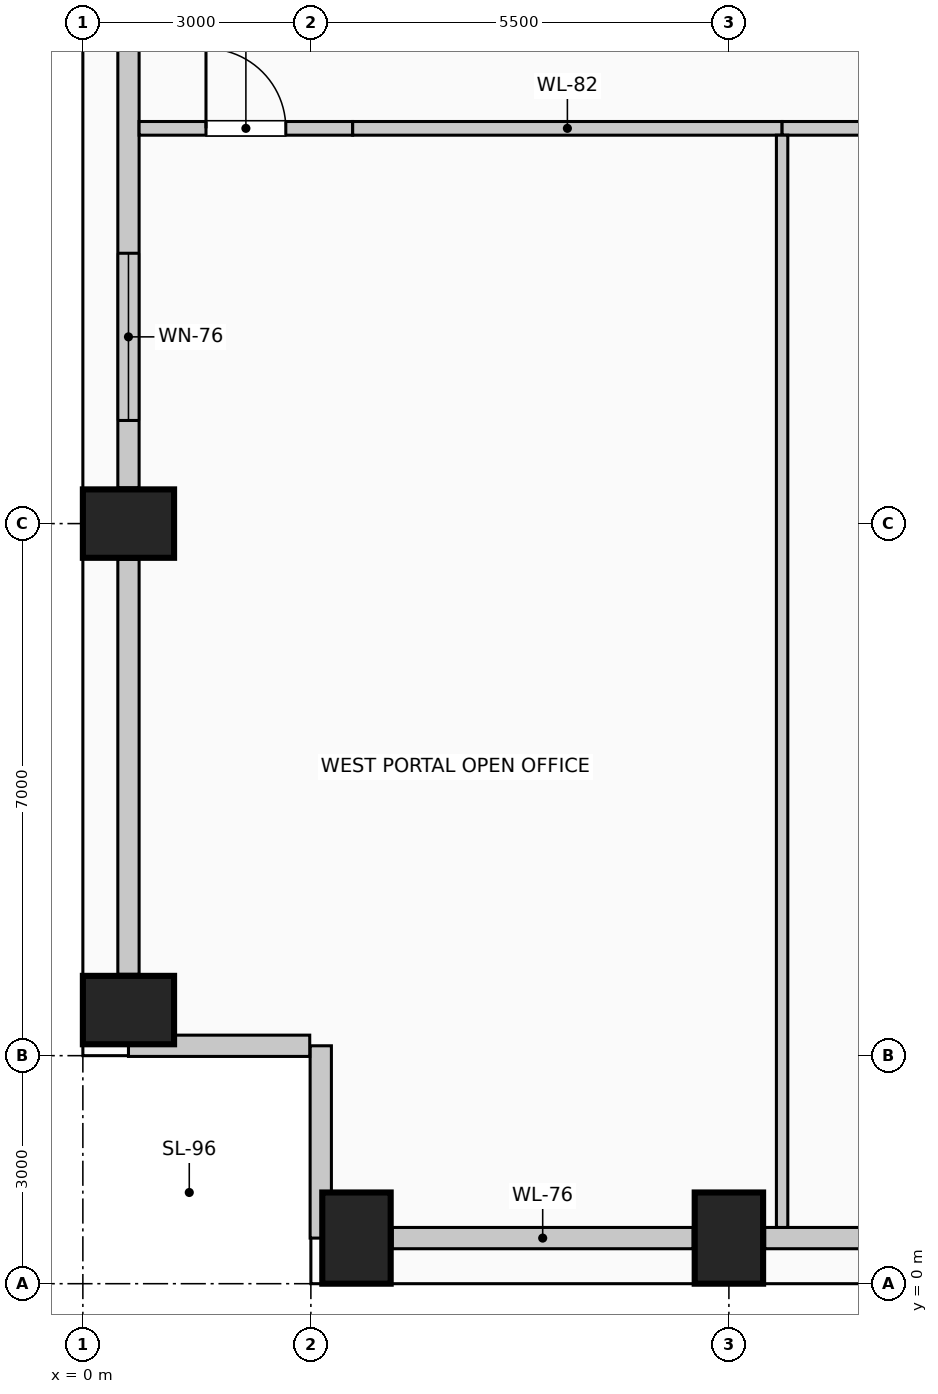
"""IFC4 building model, lengths in metres.
Left out: names, types, materials, properties, quantities, classifications, styles, units other than length and angle.
Written with IfcOpenShell. Run it as: python <this file> out.ifc"""

import sys

from ifc_helpers import new_model, si_unit, direction, frame, frame_2d, origin, origin_2d, place, context, subcontext, project, spatial, rectangle, extrude, element, fill, save


model = new_model("IFC4")
c1 = context("Model", 3, precision=1e-05, world=origin(), true_north=direction((0.0, 1.0)))
c2 = subcontext(c1, "Body", "Model", "MODEL_VIEW")
j1 = project(units=[si_unit("LENGTHUNIT", "METRE"), si_unit("PLANEANGLEUNIT", "RADIAN")], contexts=[c1])
p1 = place(None, origin())
s1 = spatial("IfcSite", under=j1, at=p1, CompositionType="ELEMENT")
p2 = place(p1, origin())
s2 = spatial("IfcBuilding", under=s1, at=p2, CompositionType="ELEMENT")
p3 = place(p2, frame((0.0, 0.0, 22.6)))
s3 = spatial("IfcBuildingStorey", under=s2, at=p3, CompositionType="ELEMENT", Elevation=22.6)
for number, where, z_axis, x_axis in (
    (1, (3.6, 0.6, 0.0), (0.0, 0.0, 1.0), (1.0, 0.0, 0.0)),
    (2, (8.5, 0.6, 0.0), (0.0, 0.0, 1.0), (1.0, 0.0, 0.0)),
    (3, (0.6, 3.6, 0.0), (0.0, 0.0, 1.0), (0.0, 1.0, 0.0)),
    (4, (0.6, 10.0, 0.0), (0.0, 0.0, 1.0), (0.0, 1.0, 0.0)),
):
    element("IfcColumn", number, at=place(p3, frame(where, z_axis=z_axis, x_axis=x_axis)), inside=s3, PredefinedType="COLUMN", context=c2, shape_type="SweptSolid", body=[
        extrude(rectangle(XDim=0.9, YDim=1.2, at=origin_2d()), origin(), (0.0, 0.0, 1.0), 4.0),
    ])
p4 = place(p3, frame((8.03, 0.6, 0.0), z_axis=(0.0, 0.0, 1.0), x_axis=(-1.0, 0.0, 0.0)))
e5 = element("IfcWall", 5, at=p4, inside=s3, PredefinedType="SOLIDWALL", context=c2, shape_type="SweptSolid", body=[
    extrude(rectangle(XDim=3.96, YDim=0.28, at=frame_2d((1.98, 0.0))), origin(), (0.0, 0.0, 1.0), 2.85),
])
p5 = place(p3, frame((13.53, 0.6, 0.0), z_axis=(0.0, 0.0, 1.0), x_axis=(-1.0, 0.0, 0.0)))
e6 = element("IfcWall", 6, at=p5, inside=s3, PredefinedType="SOLIDWALL", context=c2, shape_type="SweptSolid", body=[
    extrude(rectangle(XDim=4.56, YDim=0.28, at=frame_2d((2.28, 0.0))), origin(), (0.0, 0.0, 1.0), 2.85),
])
p6 = place(p3, frame((0.6, 4.07, 0.0), z_axis=(0.0, 0.0, 1.0), x_axis=(0.0, 1.0, 0.0)))
e7 = element("IfcWall", 7, at=p6, inside=s3, PredefinedType="SOLIDWALL", context=c2, shape_type="SweptSolid", body=[
    extrude(rectangle(XDim=5.46, YDim=0.28, at=frame_2d((2.73, 0.0))), origin(), (0.0, 0.0, 1.0), 2.85),
])
p7 = place(p3, frame((0.6, 10.47, 0.0), z_axis=(0.0, 0.0, 1.0), x_axis=(0.0, 1.0, 0.0)))
e8 = element("IfcWall", 8, at=p7, inside=s3, PredefinedType="SOLIDWALL", context=c2, shape_type="SweptSolid", body=[
    extrude(rectangle(XDim=7.06, YDim=0.28, at=frame_2d((3.53, 0.0))), origin(), (0.0, 0.0, 1.0), 2.85),
])
p8 = place(p7, frame((0.887, 0.0, 0.42)))
e9 = element("IfcOpeningElement", 9, at=p8, cuts=e8, PredefinedType="OPENING", context=c2, shape_type="SweptSolid", body=[
    extrude(rectangle(XDim=2.2, YDim=1.95, at=frame_2d((1.1, 0.975))), frame((0.0, 0.15, 0.0), z_axis=(0.0, -1.0, 0.0), x_axis=(1.0, 0.0, 0.0)), (0.0, 0.0, 1.0), 0.3),
])
p9 = place(p3, frame((3.13, 0.6, 0.0), z_axis=(0.0, 0.0, 1.0), x_axis=(0.0, 1.0, 0.0)))
e10 = element("IfcWall", 10, at=p9, inside=s3, PredefinedType="SOLIDWALL", context=c2, shape_type="SweptSolid", body=[
    extrude(rectangle(XDim=2.53, YDim=0.28, at=frame_2d((1.265, 0.0))), origin(), (0.0, 0.0, 1.0), 3.7),
])
p10 = place(p3, frame((2.985, 3.13, 0.0), z_axis=(0.0, 0.0, 1.0), x_axis=(-1.0, 0.0, 0.0)))
e11 = element("IfcWall", 11, at=p10, inside=s3, PredefinedType="SOLIDWALL", context=c2, shape_type="SweptSolid", body=[
    extrude(rectangle(XDim=2.385, YDim=0.28, at=frame_2d((1.192, 0.0))), origin(), (0.0, 0.0, 1.0), 3.7),
])
p11 = place(p3, frame((0.74, 15.2, 0.0), z_axis=(0.0, 0.0, 1.0), x_axis=(1.0, 0.0, 0.0)))
e12 = element("IfcWall", 12, at=p11, inside=s3, PredefinedType="PARTITIONING", context=c2, shape_type="SweptSolid", body=[
    extrude(rectangle(XDim=2.81, YDim=0.18, at=frame_2d((1.405, 0.0))), origin(), (0.0, 0.0, 1.0), 3.7),
])
p12 = place(p11, frame((0.88, 0.0, 0.0)))
e13 = element("IfcOpeningElement", 13, at=p12, cuts=e12, PredefinedType="OPENING", context=c2, shape_type="SweptSolid", body=[
    extrude(rectangle(XDim=1.05, YDim=2.15, at=frame_2d((0.525, 1.075))), frame((0.0, 0.1, 0.0), z_axis=(0.0, -1.0, 0.0), x_axis=(1.0, 0.0, 0.0)), (0.0, 0.0, 1.0), 0.2),
])
p13 = place(p3, frame((3.55, 15.2, 0.0), z_axis=(0.0, 0.0, 1.0), x_axis=(1.0, 0.0, 0.0)))
e14 = element("IfcWall", 14, at=p13, inside=s3, PredefinedType="PARTITIONING", context=c2, shape_type="SweptSolid", body=[
    extrude(rectangle(XDim=5.65, YDim=0.18, at=frame_2d((2.825, 0.0))), origin(), (0.0, 0.0, 1.0), 3.7),
])
p14 = place(p3, frame((9.2, 15.2, 0.0), z_axis=(0.0, 0.0, 1.0), x_axis=(1.0, 0.0, 0.0)))
e15 = element("IfcWall", 15, at=p14, inside=s3, PredefinedType="PARTITIONING", context=c2, shape_type="SweptSolid", body=[
    extrude(rectangle(XDim=7.68, YDim=0.18, at=frame_2d((3.84, 0.0))), origin(), (0.0, 0.0, 1.0), 3.7),
])
p15 = place(p14, frame((3.315, 0.0, 0.0)))
e16 = element("IfcOpeningElement", 16, at=p15, cuts=e15, PredefinedType="OPENING", context=c2, shape_type="SweptSolid", body=[
    extrude(rectangle(XDim=1.05, YDim=2.15, at=frame_2d((0.525, 1.075))), frame((0.0, 0.1, 0.0), z_axis=(0.0, -1.0, 0.0), x_axis=(1.0, 0.0, 0.0)), (0.0, 0.0, 1.0), 0.2),
])
p16 = place(p3, frame((9.2, 0.74, 0.0), z_axis=(0.0, 0.0, 1.0), x_axis=(0.0, 1.0, 0.0)))
e17 = element("IfcWall", 17, at=p16, inside=s3, PredefinedType="PARTITIONING", context=c2, shape_type="SweptSolid", body=[
    extrude(rectangle(XDim=14.37, YDim=0.15, at=frame_2d((7.185, 0.0))), origin(), (0.0, 0.0, 1.0), 3.7),
])
p17 = place(p8, origin())
e18 = element("IfcWindow", 18, at=p17, inside=s3, PartitioningType="SINGLE_PANEL", PredefinedType="WINDOW", context=c2, shape_type="SweptSolid", body=[
    extrude(rectangle(XDim=2.2, YDim=1.95, at=frame_2d((1.1, 0.975))), frame((0.0, 0.03, 0.0), z_axis=(0.0, -1.0, 0.0), x_axis=(1.0, 0.0, 0.0)), (0.0, 0.0, 1.0), 0.06),
])
fill(e9, e18)
p18 = place(p12, origin())
e19 = element("IfcDoor", 19, at=p18, inside=s3, OperationType="SINGLE_SWING_LEFT", PredefinedType="DOOR", context=c2, shape_type="SweptSolid", body=[
    extrude(rectangle(XDim=1.05, YDim=2.15, at=frame_2d((0.525, 1.075))), frame((0.0, 0.025, 0.0), z_axis=(0.0, -1.0, 0.0), x_axis=(1.0, 0.0, 0.0)), (0.0, 0.0, 1.0), 0.05),
])
fill(e13, e19)
save(model, sys.argv[1])
